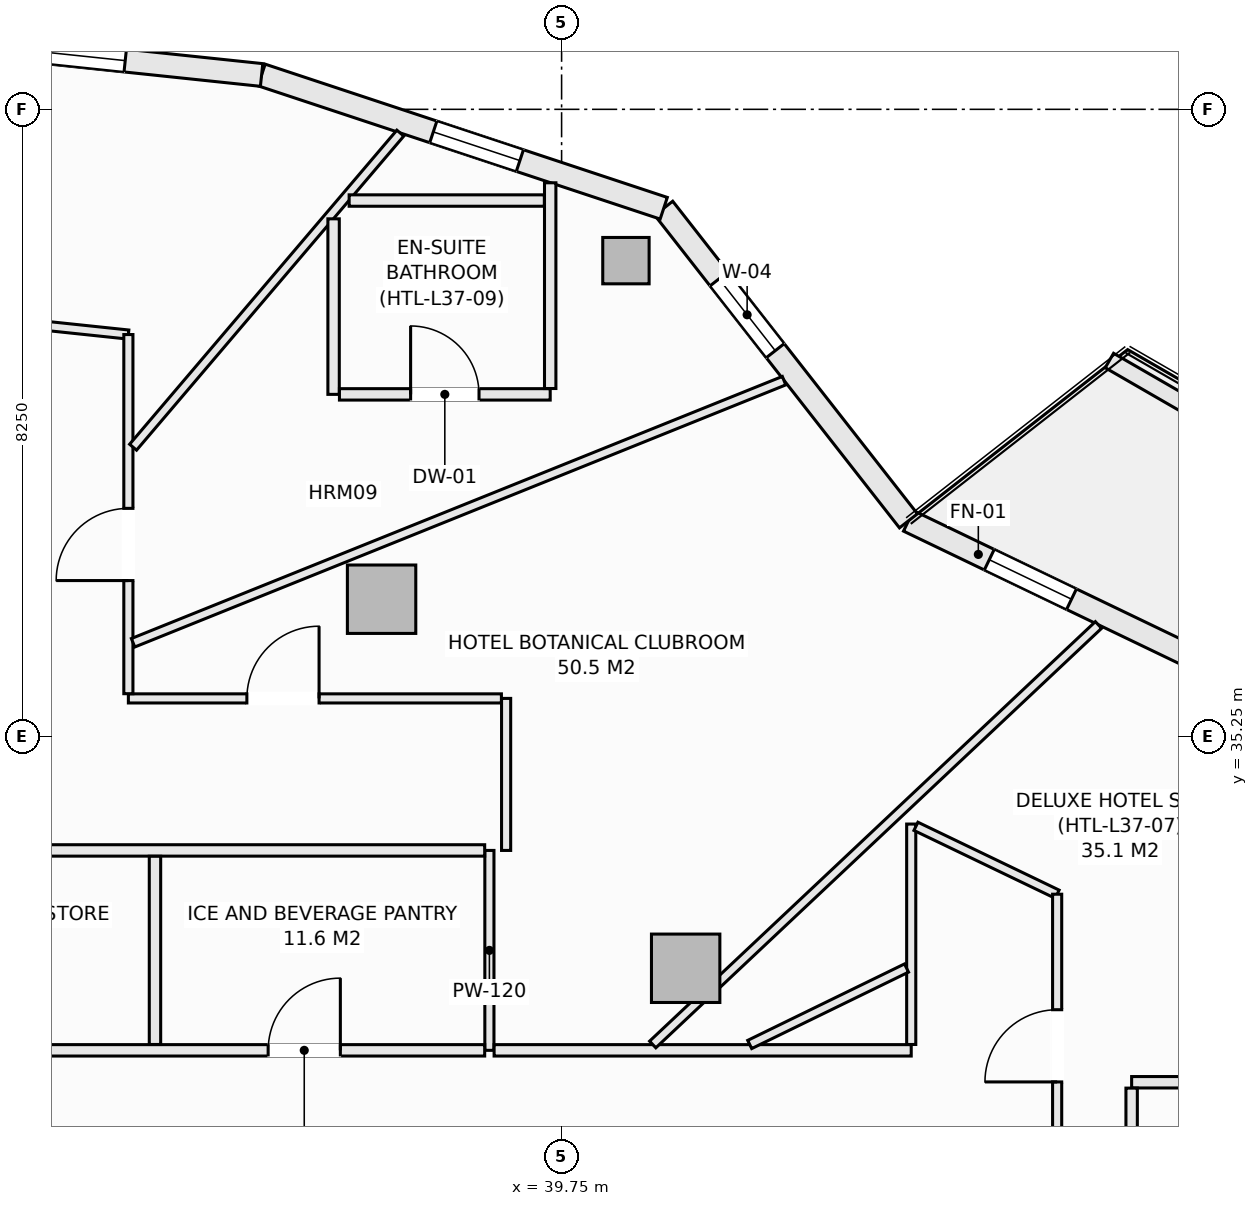
"""IFC4 building model, lengths in metres.
Left out: names, types, materials, properties, quantities, classifications, styles, units other than length and angle.
Written with IfcOpenShell. Run it as: python <this file> out.ifc"""

import sys

from ifc_helpers import new_model, si_unit, direction, frame, frame_2d, origin, origin_2d, place, context, subcontext, project, spatial, rectangle, hollow_rectangle, extrude, element, fill, save


model = new_model("IFC4")
c1 = context("Model", 3, precision=1e-05, world=origin(), true_north=direction((0.0, 1.0)))
c2 = subcontext(c1, "Body", "Model", "MODEL_VIEW")
j1 = project(units=[si_unit("LENGTHUNIT", "METRE"), si_unit("PLANEANGLEUNIT", "RADIAN")], contexts=[c1])
p1 = place(None, origin())
s1 = spatial("IfcSite", under=j1, at=p1, CompositionType="ELEMENT")
p2 = place(p1, origin())
s2 = spatial("IfcBuilding", under=s1, at=p2, CompositionType="ELEMENT")
p3 = place(p2, frame((0.0, 0.0, 146.1)))
s3 = spatial("IfcBuildingStorey", under=s2, at=p3, CompositionType="ELEMENT", Elevation=146.1)
p4 = place(p3, frame((40.596, 41.51, -0.27), z_axis=(0.0, 0.0, 1.0), x_axis=(1.0, 0.0, 0.0)))
e1 = element("IfcColumn", 1, at=p4, inside=s3, PredefinedType="COLUMN", context=c2, shape_type="SweptSolid", body=[
    extrude(hollow_rectangle(XDim=0.61, YDim=0.61, WallThickness=0.025, at=origin_2d()), origin(), (0.0, 0.0, 1.0), 3.4),
])
for number, where, z_axis, x_axis in (
    (2, (41.382, 32.199, -0.27), (0.0, 0.0, 1.0), (1.0, 0.0, 0.0)),
    (3, (37.382, 37.055, -0.27), (0.0, 0.0, 1.0), (1.0, 0.0, 0.0)),
):
    element("IfcColumn", number, at=place(p3, frame(where, z_axis=z_axis, x_axis=x_axis)), inside=s3, PredefinedType="COLUMN", context=c2, shape_type="SweptSolid", body=[
        extrude(rectangle(XDim=0.9, YDim=0.9, at=origin_2d()), origin(), (0.0, 0.0, 1.0), 3.4),
    ])
p5 = place(p3, frame((44.313, 38.086, 0.0), z_axis=(0.0, 0.0, 1.0), x_axis=(0.901353070301, -0.433085029363, 0.0)))
e4 = element("IfcWall", 4, at=p5, inside=s3, PredefinedType="SOLIDWALL", context=c2, shape_type="SweptSolid", body=[
    extrude(rectangle(XDim=5.336, YDim=0.3, at=frame_2d((2.668, 0.0))), origin(), (0.0, 0.0, 1.0), 2.653),
])
p6 = place(p5, frame((1.18, 0.0, 0.72)))
e5 = element("IfcOpeningElement", 5, at=p6, cuts=e4, PredefinedType="OPENING", context=c2, shape_type="SweptSolid", body=[
    extrude(rectangle(XDim=1.2, YDim=1.65, at=frame_2d((0.6, 0.825))), frame((0.0, 0.16, 0.0), z_axis=(0.0, -1.0, 0.0), x_axis=(1.0, 0.0, 0.0)), (0.0, 0.0, 1.0), 0.32),
])
p7 = place(p3, frame((41.094, 42.199, 0.0), z_axis=(0.0, 0.0, 1.0), x_axis=(0.616429245738, -0.787410302828, 0.0)))
e6 = element("IfcWall", 6, at=p7, inside=s3, PredefinedType="SOLIDWALL", context=c2, shape_type="SweptSolid", body=[
    extrude(rectangle(XDim=5.223, YDim=0.3, at=frame_2d((2.612, 0.0))), origin(), (0.0, 0.0, 1.0), 2.653),
])
p8 = place(p7, frame((1.18, 0.0, 0.72)))
e7 = element("IfcOpeningElement", 7, at=p8, cuts=e6, PredefinedType="OPENING", context=c2, shape_type="SweptSolid", body=[
    extrude(rectangle(XDim=1.2, YDim=1.65, at=frame_2d((0.6, 0.825))), frame((0.0, 0.16, 0.0), z_axis=(0.0, -1.0, 0.0), x_axis=(1.0, 0.0, 0.0)), (0.0, 0.0, 1.0), 0.32),
])
p9 = place(p3, frame((35.803, 43.952, 0.0), z_axis=(0.0, 0.0, 1.0), x_axis=(0.949246811547, -0.314532177636, 0.0)))
e8 = element("IfcWall", 8, at=p9, inside=s3, PredefinedType="SOLIDWALL", context=c2, shape_type="SweptSolid", body=[
    extrude(rectangle(XDim=5.574, YDim=0.3, at=frame_2d((2.787, 0.0))), origin(), (0.0, 0.0, 1.0), 2.653),
])
p10 = place(p9, frame((2.38, 0.0, 0.72)))
e9 = element("IfcOpeningElement", 9, at=p10, cuts=e8, PredefinedType="OPENING", context=c2, shape_type="SweptSolid", body=[
    extrude(rectangle(XDim=1.2, YDim=1.65, at=frame_2d((0.6, 0.825))), frame((0.0, 0.16, 0.0), z_axis=(0.0, -1.0, 0.0), x_axis=(1.0, 0.0, 0.0)), (0.0, 0.0, 1.0), 0.32),
])
p11 = place(p3, frame((30.125, 44.55, 0.0), z_axis=(0.0, 0.0, 1.0), x_axis=(0.994496545245, -0.104769372887, 0.0)))
e10 = element("IfcWall", 10, at=p11, inside=s3, PredefinedType="SOLIDWALL", context=c2, shape_type="SweptSolid", body=[
    extrude(rectangle(XDim=5.709, YDim=0.3, at=frame_2d((2.854, 0.0))), origin(), (0.0, 0.0, 1.0), 2.653),
])
p12 = place(p11, frame((1.805, 0.0, 0.74)))
e11 = element("IfcOpeningElement", 11, at=p12, cuts=e10, PredefinedType="OPENING", context=c2, shape_type="SweptSolid", body=[
    extrude(rectangle(XDim=2.1, YDim=1.7, at=frame_2d((1.05, 0.85))), frame((0.0, 0.16, 0.0), z_axis=(0.0, -1.0, 0.0), x_axis=(1.0, 0.0, 0.0)), (0.0, 0.0, 1.0), 0.32),
])
p13 = place(p3, frame((46.958, 40.195, 0.0), z_axis=(0.0, 0.0, 1.0), x_axis=(0.866058128659, -0.499943314571, 0.0)))
e12 = element("IfcWall", 12, at=p13, inside=s3, PredefinedType="PARAPET", context=c2, shape_type="SweptSolid", body=[
    extrude(rectangle(XDim=6.06, YDim=0.22, at=frame_2d((3.03, 0.0))), origin(), (0.0, 0.0, 1.0), 0.52),
])
p14 = place(p3, frame((38.8, 31.12, 0.0), z_axis=(0.0, 0.0, 1.0), x_axis=(0.0, 1.0, 0.0)))
e13 = element("IfcWall", 13, at=p14, inside=s3, PredefinedType="PARTITIONING", context=c2, shape_type="SweptSolid", body=[
    extrude(rectangle(XDim=2.63, YDim=0.12, at=frame_2d((1.315, 0.0))), origin(), (0.0, 0.0, 1.0), 3.13),
])
p15 = place(p3, frame((30.077, 31.12, 0.0), z_axis=(0.0, 0.0, 1.0), x_axis=(1.0, 0.0, 0.0)))
e14 = element("IfcWall", 14, at=p15, inside=s3, PredefinedType="PARTITIONING", context=c2, shape_type="SweptSolid", body=[
    extrude(rectangle(XDim=8.661, YDim=0.15, at=frame_2d((4.331, 0.0))), origin(), (0.0, 0.0, 1.0), 3.13),
])
p16 = place(p15, frame((1.892, 0.0, 0.0)))
e15 = element("IfcOpeningElement", 15, at=p16, cuts=e14, PredefinedType="OPENING", context=c2, shape_type="SweptSolid", body=[
    extrude(rectangle(XDim=0.95, YDim=2.1, at=frame_2d((0.475, 1.05))), frame((0.0, 0.085, 0.0), z_axis=(0.0, -1.0, 0.0), x_axis=(1.0, 0.0, 0.0)), (0.0, 0.0, 1.0), 0.17),
])
p17 = place(p15, frame((5.812, 0.0, 0.0)))
e16 = element("IfcOpeningElement", 16, at=p17, cuts=e14, PredefinedType="OPENING", context=c2, shape_type="SweptSolid", body=[
    extrude(rectangle(XDim=0.95, YDim=2.1, at=frame_2d((0.475, 1.05))), frame((0.0, 0.085, 0.0), z_axis=(0.0, -1.0, 0.0), x_axis=(1.0, 0.0, 0.0)), (0.0, 0.0, 1.0), 0.17),
])
p18 = place(p3, frame((38.862, 31.12, 0.0), z_axis=(0.0, 0.0, 1.0), x_axis=(1.0, 0.0, 0.0)))
e17 = element("IfcWall", 17, at=p18, inside=s3, PredefinedType="PARTITIONING", context=c2, shape_type="SweptSolid", body=[
    extrude(rectangle(XDim=5.488, YDim=0.15, at=frame_2d((2.744, 0.0))), origin(), (0.0, 0.0, 1.0), 3.13),
])
p19 = place(p3, frame((30.077, 33.75, 0.0), z_axis=(0.0, 0.0, 1.0), x_axis=(1.0, 0.0, 0.0)))
e18 = element("IfcWall", 18, at=p19, inside=s3, PredefinedType="PARTITIONING", context=c2, shape_type="SweptSolid", body=[
    extrude(rectangle(XDim=8.661, YDim=0.15, at=frame_2d((4.331, 0.0))), origin(), (0.0, 0.0, 1.0), 3.13),
])
p20 = place(p3, frame((34.4, 31.197, 0.0), z_axis=(0.0, 0.0, 1.0), x_axis=(0.0, 1.0, 0.0)))
e19 = element("IfcWall", 19, at=p20, inside=s3, PredefinedType="PARTITIONING", context=c2, shape_type="SweptSolid", body=[
    extrude(rectangle(XDim=2.476, YDim=0.15, at=frame_2d((1.238, 0.0))), origin(), (0.0, 0.0, 1.0), 3.13),
])
p21 = place(p3, frame((39.02, 33.75, 0.0), z_axis=(0.0, 0.0, 1.0), x_axis=(0.0, 1.0, 0.0)))
e20 = element("IfcWall", 20, at=p21, inside=s3, PredefinedType="PARTITIONING", context=c2, shape_type="SweptSolid", body=[
    extrude(rectangle(XDim=2.0, YDim=0.12, at=frame_2d((1.0, 0.0))), origin(), (0.0, 0.0, 1.0), 3.13),
])
p22 = place(p3, frame((34.05, 35.75, 0.0), z_axis=(0.0, 0.0, 1.0), x_axis=(1.0, 0.0, 0.0)))
e21 = element("IfcWall", 21, at=p22, inside=s3, PredefinedType="PARTITIONING", context=c2, shape_type="SweptSolid", body=[
    extrude(rectangle(XDim=4.908, YDim=0.12, at=frame_2d((2.454, 0.0))), origin(), (0.0, 0.0, 1.0), 2.505),
])
p23 = place(p22, frame((1.559, 0.0, 0.0)))
e22 = element("IfcOpeningElement", 22, at=p23, cuts=e21, PredefinedType="OPENING", context=c2, shape_type="SweptSolid", body=[
    extrude(rectangle(XDim=0.95, YDim=2.1, at=frame_2d((0.475, 1.05))), frame((0.0, 0.07, 0.0), z_axis=(0.0, -1.0, 0.0), x_axis=(1.0, 0.0, 0.0)), (0.0, 0.0, 1.0), 0.14),
])
p24 = place(p3, frame((32.212, 40.73, 0.0), z_axis=(0.0, 0.0, 1.0), x_axis=(0.994512688404, -0.1046160246, 0.0)))
e23 = element("IfcWall", 23, at=p24, inside=s3, PredefinedType="PARTITIONING", context=c2, shape_type="SweptSolid", body=[
    extrude(rectangle(XDim=1.848, YDim=0.12, at=frame_2d((0.924, 0.0))), origin(), (0.0, 0.0, 1.0), 3.13),
])
p25 = place(p3, frame((34.05, 35.812, 0.0), z_axis=(0.0, 0.0, 1.0), x_axis=(0.0, 1.0, 0.0)))
e24 = element("IfcWall", 24, at=p25, inside=s3, PredefinedType="PARTITIONING", context=c2, shape_type="SweptSolid", body=[
    extrude(rectangle(XDim=4.725, YDim=0.12, at=frame_2d((2.363, 0.0))), origin(), (0.0, 0.0, 1.0), 2.812),
])
p26 = place(p25, frame((1.488, 0.0, 0.0)))
e25 = element("IfcOpeningElement", 25, at=p26, cuts=e24, PredefinedType="OPENING", context=c2, shape_type="SweptSolid", body=[
    extrude(rectangle(XDim=0.95, YDim=2.1, at=frame_2d((0.475, 1.05))), frame((0.0, 0.07, 0.0), z_axis=(0.0, -1.0, 0.0), x_axis=(1.0, 0.0, 0.0)), (0.0, 0.0, 1.0), 0.14),
])
p27 = place(p3, frame((44.35, 31.197, 0.0), z_axis=(0.0, 0.0, 1.0), x_axis=(0.0, 1.0, 0.0)))
e26 = element("IfcWall", 26, at=p27, inside=s3, PredefinedType="PARTITIONING", context=c2, shape_type="SweptSolid", body=[
    extrude(rectangle(XDim=2.9, YDim=0.12, at=frame_2d((1.45, 0.0))), origin(), (0.0, 0.0, 1.0), 3.13),
])
p28 = place(p3, frame((44.412, 34.067, 0.0), z_axis=(0.0, 0.0, 1.0), x_axis=(0.90128266231, -0.433231534656, 0.0)))
e27 = element("IfcWall", 27, at=p28, inside=s3, PredefinedType="PARTITIONING", context=c2, shape_type="SweptSolid", body=[
    extrude(rectangle(XDim=2.062, YDim=0.12, at=frame_2d((1.031, 0.0))), origin(), (0.0, 0.0, 1.0), 3.13),
])
p29 = place(p3, frame((46.27, 20.826, 0.0), z_axis=(0.0, 0.0, 1.0), x_axis=(0.0, 1.0, 0.0)))
e28 = element("IfcWall", 28, at=p29, inside=s3, PredefinedType="PARTITIONING", context=c2, shape_type="SweptSolid", body=[
    extrude(rectangle(XDim=12.348, YDim=0.12, at=frame_2d((6.174, 0.0))), origin(), (0.0, 0.0, 1.0), 3.13),
])
p30 = place(p29, frame((3.556, 0.0, 0.0)))
e29 = element("IfcOpeningElement", 29, at=p30, cuts=e28, PredefinedType="OPENING", context=c2, shape_type="SweptSolid", body=[
    extrude(rectangle(XDim=0.95, YDim=2.1, at=frame_2d((0.475, 1.05))), frame((0.0, 0.07, 0.0), z_axis=(0.0, -1.0, 0.0), x_axis=(1.0, 0.0, 0.0)), (0.0, 0.0, 1.0), 0.14),
])
p31 = place(p29, frame((9.878, 0.0, 0.0)))
e30 = element("IfcOpeningElement", 30, at=p31, cuts=e28, PredefinedType="OPENING", context=c2, shape_type="SweptSolid", body=[
    extrude(rectangle(XDim=0.95, YDim=2.1, at=frame_2d((0.475, 1.05))), frame((0.0, 0.07, 0.0), z_axis=(0.0, -1.0, 0.0), x_axis=(1.0, 0.0, 0.0)), (0.0, 0.0, 1.0), 0.14),
])
p32 = place(p3, frame((47.25, 30.7, 0.0), z_axis=(0.0, 0.0, 1.0), x_axis=(1.0, 0.0, 0.0)))
e31 = element("IfcWall", 31, at=p32, inside=s3, PredefinedType="PARTITIONING", context=c2, shape_type="SweptSolid", body=[
    extrude(rectangle(XDim=2.323, YDim=0.15, at=frame_2d((1.162, 0.0))), origin(), (0.0, 0.0, 1.0), 3.13),
])
p33 = place(p32, frame((0.711, 0.0, 0.0)))
e32 = element("IfcOpeningElement", 32, at=p33, cuts=e31, PredefinedType="OPENING", context=c2, shape_type="SweptSolid", body=[
    extrude(rectangle(XDim=0.9, YDim=2.1, at=frame_2d((0.45, 1.05))), frame((0.0, 0.085, 0.0), z_axis=(0.0, -1.0, 0.0), x_axis=(1.0, 0.0, 0.0)), (0.0, 0.0, 1.0), 0.17),
])
p34 = place(p3, frame((47.25, 28.654, 0.0), z_axis=(0.0, 0.0, 1.0), x_axis=(0.0, 1.0, 0.0)))
e33 = element("IfcWall", 33, at=p34, inside=s3, PredefinedType="PARTITIONING", context=c2, shape_type="SweptSolid", body=[
    extrude(rectangle(XDim=1.969, YDim=0.15, at=frame_2d((0.984, 0.0))), origin(), (0.0, 0.0, 1.0), 3.13),
])
p35 = place(p3, frame((42.225, 31.197, 0.0), z_axis=(0.0, 0.0, 1.0), x_axis=(0.898870643835, 0.438214063732, 0.0)))
e34 = element("IfcWall", 34, at=p35, inside=s3, PredefinedType="PARTITIONING", context=c2, shape_type="SweptSolid", body=[
    extrude(rectangle(XDim=2.295, YDim=0.12, at=frame_2d((1.148, 0.0))), origin(), (0.0, 0.0, 1.0), 3.13),
])
p36 = place(p3, frame((40.949, 31.197, 0.0), z_axis=(0.0, 0.0, 1.0), x_axis=(0.728258728927, 0.685302286397, 0.0)))
e35 = element("IfcWall", 35, at=p36, inside=s3, PredefinedType="PARTITIONING", context=c2, shape_type="SweptSolid", body=[
    extrude(rectangle(XDim=8.053, YDim=0.12, at=frame_2d((4.027, 0.0))), origin(), (0.0, 0.0, 1.0), 2.812),
])
p37 = place(p3, frame((34.112, 36.482, 0.0), z_axis=(0.0, 0.0, 1.0), x_axis=(0.92763911586, 0.373477804863, 0.0)))
e36 = element("IfcWall", 36, at=p37, inside=s3, PredefinedType="PARTITIONING", context=c2, shape_type="SweptSolid", body=[
    extrude(rectangle(XDim=9.233, YDim=0.12, at=frame_2d((4.616, 0.0))), origin(), (0.0, 0.0, 1.0), 2.505),
])
p38 = place(p3, frame((34.112, 39.055, 0.0), z_axis=(0.0, 0.0, 1.0), x_axis=(0.64805977237, 0.761589476973, 0.0)))
e37 = element("IfcWall", 37, at=p38, inside=s3, PredefinedType="PARTITIONING", context=c2, shape_type="SweptSolid", body=[
    extrude(rectangle(XDim=5.426, YDim=0.12, at=frame_2d((2.713, 0.0))), origin(), (0.0, 0.0, 1.0), 2.812),
])
p39 = place(p3, frame((36.75, 39.75, 0.0), z_axis=(0.0, 0.0, 1.0), x_axis=(0.0, 1.0, 0.0)))
e38 = element("IfcWall", 38, at=p39, inside=s3, PredefinedType="PARTITIONING", context=c2, shape_type="SweptSolid", body=[
    extrude(rectangle(XDim=2.309, YDim=0.15, at=frame_2d((1.155, 0.0))), origin(), (0.0, 0.0, 1.0), 3.13),
])
p40 = place(p3, frame((36.827, 39.75, 0.0), z_axis=(0.0, 0.0, 1.0), x_axis=(1.0, 0.0, 0.0)))
e39 = element("IfcWall", 39, at=p40, inside=s3, PredefinedType="PARTITIONING", context=c2, shape_type="SweptSolid", body=[
    extrude(rectangle(XDim=2.773, YDim=0.15, at=frame_2d((1.387, 0.0))), origin(), (0.0, 0.0, 1.0), 3.13),
])
p41 = place(p40, frame((0.937, 0.0, 0.0)))
e40 = element("IfcOpeningElement", 40, at=p41, cuts=e39, PredefinedType="OPENING", context=c2, shape_type="SweptSolid", body=[
    extrude(rectangle(XDim=0.9, YDim=2.1, at=frame_2d((0.45, 1.05))), frame((0.0, 0.085, 0.0), z_axis=(0.0, -1.0, 0.0), x_axis=(1.0, 0.0, 0.0)), (0.0, 0.0, 1.0), 0.17),
])
p42 = place(p3, frame((39.6, 39.827, 0.0), z_axis=(0.0, 0.0, 1.0), x_axis=(0.0, 1.0, 0.0)))
e41 = element("IfcWall", 41, at=p42, inside=s3, PredefinedType="PARTITIONING", context=c2, shape_type="SweptSolid", body=[
    extrude(rectangle(XDim=2.707, YDim=0.15, at=frame_2d((1.354, 0.0))), origin(), (0.0, 0.0, 1.0), 2.505),
])
p43 = place(p3, frame((36.955, 42.3, 0.0), z_axis=(0.0, 0.0, 1.0), x_axis=(1.0, 0.0, 0.0)))
e42 = element("IfcWall", 42, at=p43, inside=s3, PredefinedType="PARTITIONING", context=c2, shape_type="SweptSolid", body=[
    extrude(rectangle(XDim=2.568, YDim=0.15, at=frame_2d((1.284, 0.0))), origin(), (0.0, 0.0, 1.0), 2.653),
])
p44 = place(p6, origin())
e43 = element("IfcWindow", 43, at=p44, inside=s3, PartitioningType="SINGLE_PANEL", PredefinedType="WINDOW", context=c2, shape_type="SweptSolid", body=[
    extrude(rectangle(XDim=1.2, YDim=1.65, at=frame_2d((0.6, 0.825))), frame((0.0, 0.03, 0.0), z_axis=(0.0, -1.0, 0.0), x_axis=(1.0, 0.0, 0.0)), (0.0, 0.0, 1.0), 0.06),
])
fill(e5, e43)
p45 = place(p8, origin())
e44 = element("IfcWindow", 44, at=p45, inside=s3, PartitioningType="SINGLE_PANEL", PredefinedType="WINDOW", context=c2, shape_type="SweptSolid", body=[
    extrude(rectangle(XDim=1.2, YDim=1.65, at=frame_2d((0.6, 0.825))), frame((0.0, 0.03, 0.0), z_axis=(0.0, -1.0, 0.0), x_axis=(1.0, 0.0, 0.0)), (0.0, 0.0, 1.0), 0.06),
])
fill(e7, e44)
p46 = place(p10, origin())
e45 = element("IfcWindow", 45, at=p46, inside=s3, PartitioningType="SINGLE_PANEL", PredefinedType="WINDOW", context=c2, shape_type="SweptSolid", body=[
    extrude(rectangle(XDim=1.2, YDim=1.65, at=frame_2d((0.6, 0.825))), frame((0.0, 0.03, 0.0), z_axis=(0.0, -1.0, 0.0), x_axis=(1.0, 0.0, 0.0)), (0.0, 0.0, 1.0), 0.06),
])
fill(e9, e45)
p47 = place(p12, origin())
e46 = element("IfcWindow", 46, at=p47, inside=s3, PartitioningType="SINGLE_PANEL", PredefinedType="WINDOW", context=c2, shape_type="SweptSolid", body=[
    extrude(rectangle(XDim=2.1, YDim=1.7, at=frame_2d((1.05, 0.85))), frame((0.0, 0.03, 0.0), z_axis=(0.0, -1.0, 0.0), x_axis=(1.0, 0.0, 0.0)), (0.0, 0.0, 1.0), 0.06),
])
fill(e11, e46)
p48 = place(p17, origin())
e47 = element("IfcDoor", 47, at=p48, inside=s3, OperationType="SINGLE_SWING_RIGHT", PredefinedType="DOOR", context=c2, shape_type="SweptSolid", body=[
    extrude(rectangle(XDim=0.95, YDim=2.1, at=frame_2d((0.475, 1.05))), frame((0.0, 0.025, 0.0), z_axis=(0.0, -1.0, 0.0), x_axis=(1.0, 0.0, 0.0)), (0.0, 0.0, 1.0), 0.05),
])
fill(e16, e47)
p49 = place(p31, origin())
e48 = element("IfcDoor", 48, at=p49, inside=s3, OperationType="SINGLE_SWING_LEFT", PredefinedType="DOOR", context=c2, shape_type="SweptSolid", body=[
    extrude(rectangle(XDim=0.95, YDim=2.1, at=frame_2d((0.475, 1.05))), frame((0.0, 0.025, 0.0), z_axis=(0.0, -1.0, 0.0), x_axis=(1.0, 0.0, 0.0)), (0.0, 0.0, 1.0), 0.05),
])
fill(e30, e48)
p50 = place(p23, origin())
e49 = element("IfcDoor", 49, at=p50, inside=s3, OperationType="SINGLE_SWING_RIGHT", PredefinedType="DOOR", context=c2, shape_type="SweptSolid", body=[
    extrude(rectangle(XDim=0.95, YDim=2.1, at=frame_2d((0.475, 1.05))), frame((0.0, 0.025, 0.0), z_axis=(0.0, -1.0, 0.0), x_axis=(1.0, 0.0, 0.0)), (0.0, 0.0, 1.0), 0.05),
])
fill(e22, e49)
p51 = place(p26, origin())
e50 = element("IfcDoor", 50, at=p51, inside=s3, OperationType="SINGLE_SWING_LEFT", PredefinedType="DOOR", context=c2, shape_type="SweptSolid", body=[
    extrude(rectangle(XDim=0.95, YDim=2.1, at=frame_2d((0.475, 1.05))), frame((0.0, 0.025, 0.0), z_axis=(0.0, -1.0, 0.0), x_axis=(1.0, 0.0, 0.0)), (0.0, 0.0, 1.0), 0.05),
])
fill(e25, e50)
p52 = place(p41, origin())
e51 = element("IfcDoor", 51, at=p52, inside=s3, OperationType="SINGLE_SWING_LEFT", PredefinedType="DOOR", context=c2, shape_type="SweptSolid", body=[
    extrude(rectangle(XDim=0.9, YDim=2.1, at=frame_2d((0.45, 1.05))), frame((0.0, 0.025, 0.0), z_axis=(0.0, -1.0, 0.0), x_axis=(1.0, 0.0, 0.0)), (0.0, 0.0, 1.0), 0.05),
])
fill(e40, e51)
save(model, sys.argv[1])
